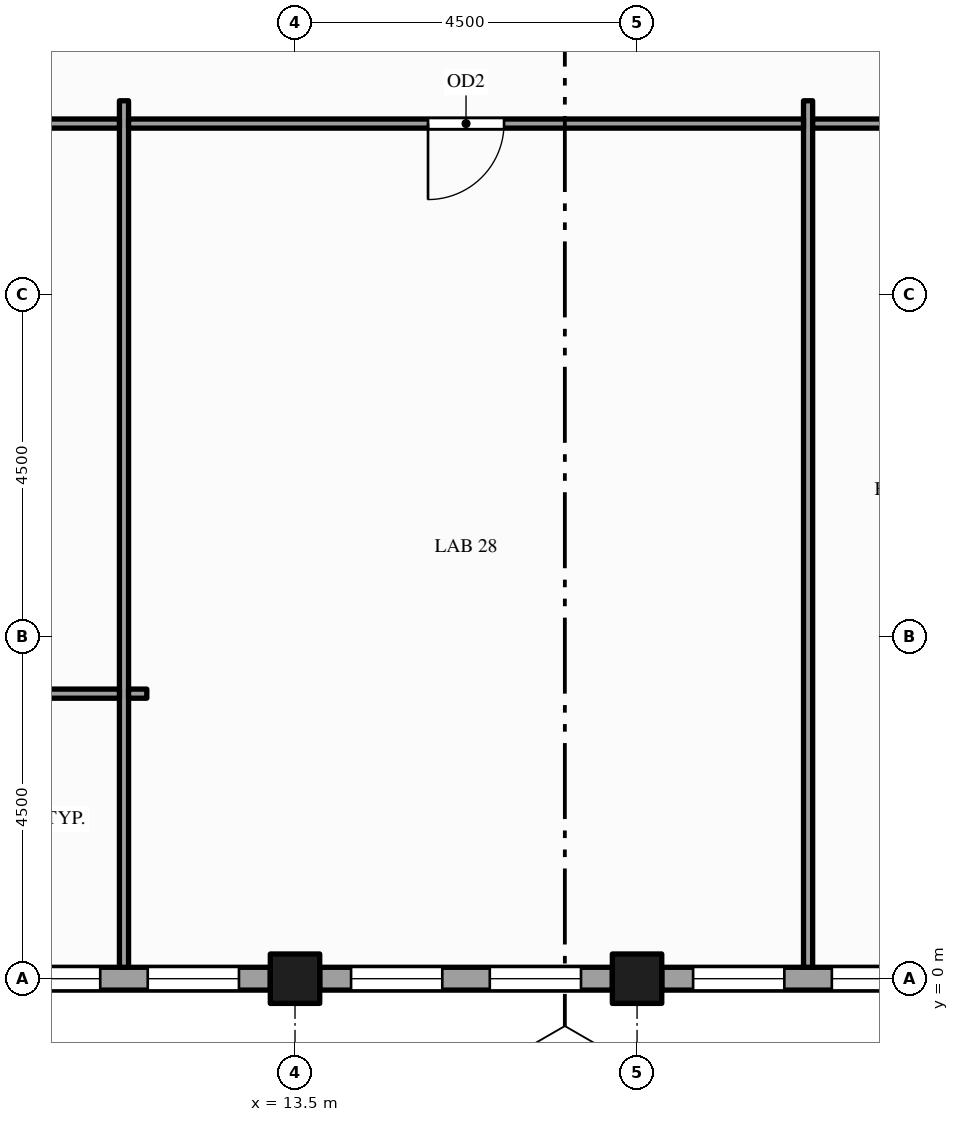
"""IFC4 building model, lengths in metres.
Left out: names, types, materials, properties, quantities, classifications, styles, units other than length and angle.
Written with IfcOpenShell. Run it as: python <this file> out.ifc"""

import sys

from ifc_helpers import new_model, si_unit, direction, frame, frame_2d, origin, origin_2d, place, context, subcontext, project, spatial, rectangle, hollow_rectangle, extrude, element, fill, save


model = new_model("IFC4")
c1 = context("Model", 3, precision=1e-05, world=origin(), true_north=direction((0.0, 1.0)))
c2 = subcontext(c1, "Body", "Model", "MODEL_VIEW")
j1 = project(units=[si_unit("LENGTHUNIT", "METRE"), si_unit("PLANEANGLEUNIT", "RADIAN")], contexts=[c1])
p1 = place(None, origin())
s1 = spatial("IfcSite", under=j1, at=p1, CompositionType="ELEMENT")
p2 = place(p1, origin())
s2 = spatial("IfcBuilding", under=s1, at=p2, CompositionType="ELEMENT")
p3 = place(p2, frame((0.0, 0.0, 261.0)))
s3 = spatial("IfcBuildingStorey", under=s2, at=p3, CompositionType="ELEMENT", Elevation=261.0)
for number, where, z_axis, x_axis in (
    (1, (13.5, 0.0, -0.15), (0.0, 0.0, 1.0), (1.0, 0.0, 0.0)),
    (2, (18.0, 0.0, -0.15), (0.0, 0.0, 1.0), (1.0, 0.0, 0.0)),
):
    element("IfcColumn", number, at=place(p3, frame(where, z_axis=z_axis, x_axis=x_axis)), inside=s3, PredefinedType="COLUMN", context=c2, shape_type="SweptSolid", body=[
        extrude(hollow_rectangle(XDim=0.65, YDim=0.65, WallThickness=0.032, at=origin_2d()), origin(), (0.0, 0.0, 1.0), 4.0),
    ])
p4 = place(p3, frame((9.325, 0.0, 0.0), z_axis=(0.0, 0.0, 1.0), x_axis=(1.0, 0.0, 0.0)))
e3 = element("IfcWall", 3, at=p4, inside=s3, PredefinedType="STANDARD", context=c2, shape_type="SweptSolid", body=[
    extrude(rectangle(XDim=3.85, YDim=0.3, at=frame_2d((1.925, 0.0))), origin(), (0.0, 0.0, 1.0), 2.87),
])
p5 = place(p4, frame((0.413, 0.0, 0.9)))
e4 = element("IfcOpeningElement", 4, at=p5, cuts=e3, PredefinedType="OPENING", context=c2, shape_type="SweptSolid", body=[
    extrude(rectangle(XDim=1.2, YDim=1.75, at=frame_2d((0.6, 0.875))), frame((0.0, 0.16, 0.0), z_axis=(0.0, -1.0, 0.0), x_axis=(1.0, 0.0, 0.0)), (0.0, 0.0, 1.0), 0.32),
])
p6 = place(p4, frame((2.238, 0.0, 0.9)))
e5 = element("IfcOpeningElement", 5, at=p6, cuts=e3, PredefinedType="OPENING", context=c2, shape_type="SweptSolid", body=[
    extrude(rectangle(XDim=1.2, YDim=1.75, at=frame_2d((0.6, 0.875))), frame((0.0, 0.16, 0.0), z_axis=(0.0, -1.0, 0.0), x_axis=(1.0, 0.0, 0.0)), (0.0, 0.0, 1.0), 0.32),
])
p7 = place(p3, frame((13.825, 0.0, 0.0), z_axis=(0.0, 0.0, 1.0), x_axis=(1.0, 0.0, 0.0)))
e6 = element("IfcWall", 6, at=p7, inside=s3, PredefinedType="STANDARD", context=c2, shape_type="SweptSolid", body=[
    extrude(rectangle(XDim=3.85, YDim=0.3, at=frame_2d((1.925, 0.0))), origin(), (0.0, 0.0, 1.0), 2.87),
])
p8 = place(p7, frame((0.413, 0.0, 0.9)))
e7 = element("IfcOpeningElement", 7, at=p8, cuts=e6, PredefinedType="OPENING", context=c2, shape_type="SweptSolid", body=[
    extrude(rectangle(XDim=1.2, YDim=1.75, at=frame_2d((0.6, 0.875))), frame((0.0, 0.16, 0.0), z_axis=(0.0, -1.0, 0.0), x_axis=(1.0, 0.0, 0.0)), (0.0, 0.0, 1.0), 0.32),
])
p9 = place(p7, frame((2.238, 0.0, 0.9)))
e8 = element("IfcOpeningElement", 8, at=p9, cuts=e6, PredefinedType="OPENING", context=c2, shape_type="SweptSolid", body=[
    extrude(rectangle(XDim=1.2, YDim=1.75, at=frame_2d((0.6, 0.875))), frame((0.0, 0.16, 0.0), z_axis=(0.0, -1.0, 0.0), x_axis=(1.0, 0.0, 0.0)), (0.0, 0.0, 1.0), 0.32),
])
p10 = place(p3, frame((18.325, 0.0, 0.0), z_axis=(0.0, 0.0, 1.0), x_axis=(1.0, 0.0, 0.0)))
e9 = element("IfcWall", 9, at=p10, inside=s3, PredefinedType="STANDARD", context=c2, shape_type="SweptSolid", body=[
    extrude(rectangle(XDim=3.85, YDim=0.3, at=frame_2d((1.925, 0.0))), origin(), (0.0, 0.0, 1.0), 2.87),
])
p11 = place(p10, frame((0.413, 0.0, 0.9)))
e10 = element("IfcOpeningElement", 10, at=p11, cuts=e9, PredefinedType="OPENING", context=c2, shape_type="SweptSolid", body=[
    extrude(rectangle(XDim=1.2, YDim=1.75, at=frame_2d((0.6, 0.875))), frame((0.0, 0.16, 0.0), z_axis=(0.0, -1.0, 0.0), x_axis=(1.0, 0.0, 0.0)), (0.0, 0.0, 1.0), 0.32),
])
p12 = place(p10, frame((2.238, 0.0, 0.9)))
e11 = element("IfcOpeningElement", 11, at=p12, cuts=e9, PredefinedType="OPENING", context=c2, shape_type="SweptSolid", body=[
    extrude(rectangle(XDim=1.2, YDim=1.75, at=frame_2d((0.6, 0.875))), frame((0.0, 0.16, 0.0), z_axis=(0.0, -1.0, 0.0), x_axis=(1.0, 0.0, 0.0)), (0.0, 0.0, 1.0), 0.32),
])
for number, where, z_axis, x_axis in (
    (12, (11.25, 0.15, 0.0), (0.0, 0.0, 1.0), (0.0, 1.0, 0.0)),
    (13, (20.25, 0.15, 0.0), (0.0, 0.0, 1.0), (0.0, 1.0, 0.0)),
):
    element("IfcWall", number, at=place(p3, frame(where, z_axis=z_axis, x_axis=x_axis)), inside=s3, PredefinedType="PARTITIONING", context=c2, shape_type="SweptSolid", body=[
        extrude(rectangle(XDim=11.4, YDim=0.12, at=frame_2d((5.7, 0.0))), origin(), (0.0, 0.0, 1.0), 2.87),
    ])
p13 = place(p3, frame((9.125, 3.75, 0.0), z_axis=(0.0, 0.0, 1.0), x_axis=(1.0, 0.0, 0.0)))
e14 = element("IfcWall", 14, at=p13, inside=s3, PredefinedType="PARTITIONING", context=c2, shape_type="SweptSolid", body=[
    extrude(rectangle(XDim=2.065, YDim=0.12, at=frame_2d((1.032, 0.0))), origin(), (0.0, 0.0, 1.0), 2.87),
])
p14 = place(p3, frame((11.31, 3.75, 0.0), z_axis=(0.0, 0.0, 1.0), x_axis=(1.0, 0.0, 0.0)))
e15 = element("IfcWall", 15, at=p14, inside=s3, PredefinedType="PARTITIONING", context=c2, shape_type="SweptSolid", body=[
    extrude(rectangle(XDim=0.24, YDim=0.12, at=frame_2d((0.12, 0.0))), origin(), (0.0, 0.0, 1.0), 2.87),
])
p15 = place(p3, frame((0.15, 11.25, 0.0), z_axis=(0.0, 0.0, 1.0), x_axis=(1.0, 0.0, 0.0)))
e16 = element("IfcWall", 16, at=p15, inside=s3, PredefinedType="PARTITIONING", context=c2, shape_type="SweptSolid", body=[
    extrude(rectangle(XDim=11.04, YDim=0.12, at=frame_2d((5.52, 0.0))), origin(), (0.0, 0.0, 1.0), 2.87),
])
p16 = place(p15, frame((4.93, 0.0, 0.0)))
e17 = element("IfcOpeningElement", 17, at=p16, cuts=e16, PredefinedType="OPENING", context=c2, shape_type="SweptSolid", body=[
    extrude(rectangle(XDim=1.2, YDim=2.1, at=frame_2d((0.6, 1.05))), frame((0.0, 0.07, 0.0), z_axis=(0.0, -1.0, 0.0), x_axis=(1.0, 0.0, 0.0)), (0.0, 0.0, 1.0), 0.14),
])
p17 = place(p3, frame((11.31, 11.25, 0.0), z_axis=(0.0, 0.0, 1.0), x_axis=(1.0, 0.0, 0.0)))
e18 = element("IfcWall", 18, at=p17, inside=s3, PredefinedType="PARTITIONING", context=c2, shape_type="SweptSolid", body=[
    extrude(rectangle(XDim=8.88, YDim=0.12, at=frame_2d((4.44, 0.0))), origin(), (0.0, 0.0, 1.0), 2.87),
])
p18 = place(p17, frame((3.94, 0.0, 0.0)))
e19 = element("IfcOpeningElement", 19, at=p18, cuts=e18, PredefinedType="OPENING", context=c2, shape_type="SweptSolid", body=[
    extrude(rectangle(XDim=1.0, YDim=2.1, at=frame_2d((0.5, 1.05))), frame((0.0, 0.07, 0.0), z_axis=(0.0, -1.0, 0.0), x_axis=(1.0, 0.0, 0.0)), (0.0, 0.0, 1.0), 0.14),
])
p19 = place(p3, frame((20.31, 11.25, 0.0), z_axis=(0.0, 0.0, 1.0), x_axis=(1.0, 0.0, 0.0)))
e20 = element("IfcWall", 20, at=p19, inside=s3, PredefinedType="PARTITIONING", context=c2, shape_type="SweptSolid", body=[
    extrude(rectangle(XDim=4.38, YDim=0.12, at=frame_2d((2.19, 0.0))), origin(), (0.0, 0.0, 1.0), 2.87),
])
p20 = place(p19, frame((1.74, 0.0, 0.0)))
e21 = element("IfcOpeningElement", 21, at=p20, cuts=e20, PredefinedType="OPENING", context=c2, shape_type="SweptSolid", body=[
    extrude(rectangle(XDim=0.9, YDim=2.1, at=frame_2d((0.45, 1.05))), frame((0.0, 0.07, 0.0), z_axis=(0.0, -1.0, 0.0), x_axis=(1.0, 0.0, 0.0)), (0.0, 0.0, 1.0), 0.14),
])
p21 = place(p5, origin())
e22 = element("IfcWindow", 22, at=p21, inside=s3, PartitioningType="SINGLE_PANEL", PredefinedType="WINDOW", context=c2, shape_type="SweptSolid", body=[
    extrude(rectangle(XDim=1.2, YDim=1.75, at=frame_2d((0.6, 0.875))), frame((0.0, 0.03, 0.0), z_axis=(0.0, -1.0, 0.0), x_axis=(1.0, 0.0, 0.0)), (0.0, 0.0, 1.0), 0.06),
])
fill(e4, e22)
p22 = place(p6, origin())
e23 = element("IfcWindow", 23, at=p22, inside=s3, PartitioningType="SINGLE_PANEL", PredefinedType="WINDOW", context=c2, shape_type="SweptSolid", body=[
    extrude(rectangle(XDim=1.2, YDim=1.75, at=frame_2d((0.6, 0.875))), frame((0.0, 0.03, 0.0), z_axis=(0.0, -1.0, 0.0), x_axis=(1.0, 0.0, 0.0)), (0.0, 0.0, 1.0), 0.06),
])
fill(e5, e23)
p23 = place(p8, origin())
e24 = element("IfcWindow", 24, at=p23, inside=s3, PartitioningType="SINGLE_PANEL", PredefinedType="WINDOW", context=c2, shape_type="SweptSolid", body=[
    extrude(rectangle(XDim=1.2, YDim=1.75, at=frame_2d((0.6, 0.875))), frame((0.0, 0.03, 0.0), z_axis=(0.0, -1.0, 0.0), x_axis=(1.0, 0.0, 0.0)), (0.0, 0.0, 1.0), 0.06),
])
fill(e7, e24)
p24 = place(p9, origin())
e25 = element("IfcWindow", 25, at=p24, inside=s3, PartitioningType="SINGLE_PANEL", PredefinedType="WINDOW", context=c2, shape_type="SweptSolid", body=[
    extrude(rectangle(XDim=1.2, YDim=1.75, at=frame_2d((0.6, 0.875))), frame((0.0, 0.03, 0.0), z_axis=(0.0, -1.0, 0.0), x_axis=(1.0, 0.0, 0.0)), (0.0, 0.0, 1.0), 0.06),
])
fill(e8, e25)
p25 = place(p11, origin())
e26 = element("IfcWindow", 26, at=p25, inside=s3, PartitioningType="SINGLE_PANEL", PredefinedType="WINDOW", context=c2, shape_type="SweptSolid", body=[
    extrude(rectangle(XDim=1.2, YDim=1.75, at=frame_2d((0.6, 0.875))), frame((0.0, 0.03, 0.0), z_axis=(0.0, -1.0, 0.0), x_axis=(1.0, 0.0, 0.0)), (0.0, 0.0, 1.0), 0.06),
])
fill(e10, e26)
p26 = place(p12, origin())
e27 = element("IfcWindow", 27, at=p26, inside=s3, PartitioningType="SINGLE_PANEL", PredefinedType="WINDOW", context=c2, shape_type="SweptSolid", body=[
    extrude(rectangle(XDim=1.2, YDim=1.75, at=frame_2d((0.6, 0.875))), frame((0.0, 0.03, 0.0), z_axis=(0.0, -1.0, 0.0), x_axis=(1.0, 0.0, 0.0)), (0.0, 0.0, 1.0), 0.06),
])
fill(e11, e27)
p27 = place(p18, origin())
e28 = element("IfcDoor", 28, at=p27, inside=s3, OperationType="SINGLE_SWING_LEFT", PredefinedType="DOOR", context=c2, shape_type="SweptSolid", body=[
    extrude(rectangle(XDim=1.0, YDim=2.1, at=frame_2d((0.5, 1.05))), frame((0.0, 0.025, 0.0), z_axis=(0.0, -1.0, 0.0), x_axis=(1.0, 0.0, 0.0)), (0.0, 0.0, 1.0), 0.05),
])
fill(e19, e28)
save(model, sys.argv[1])
